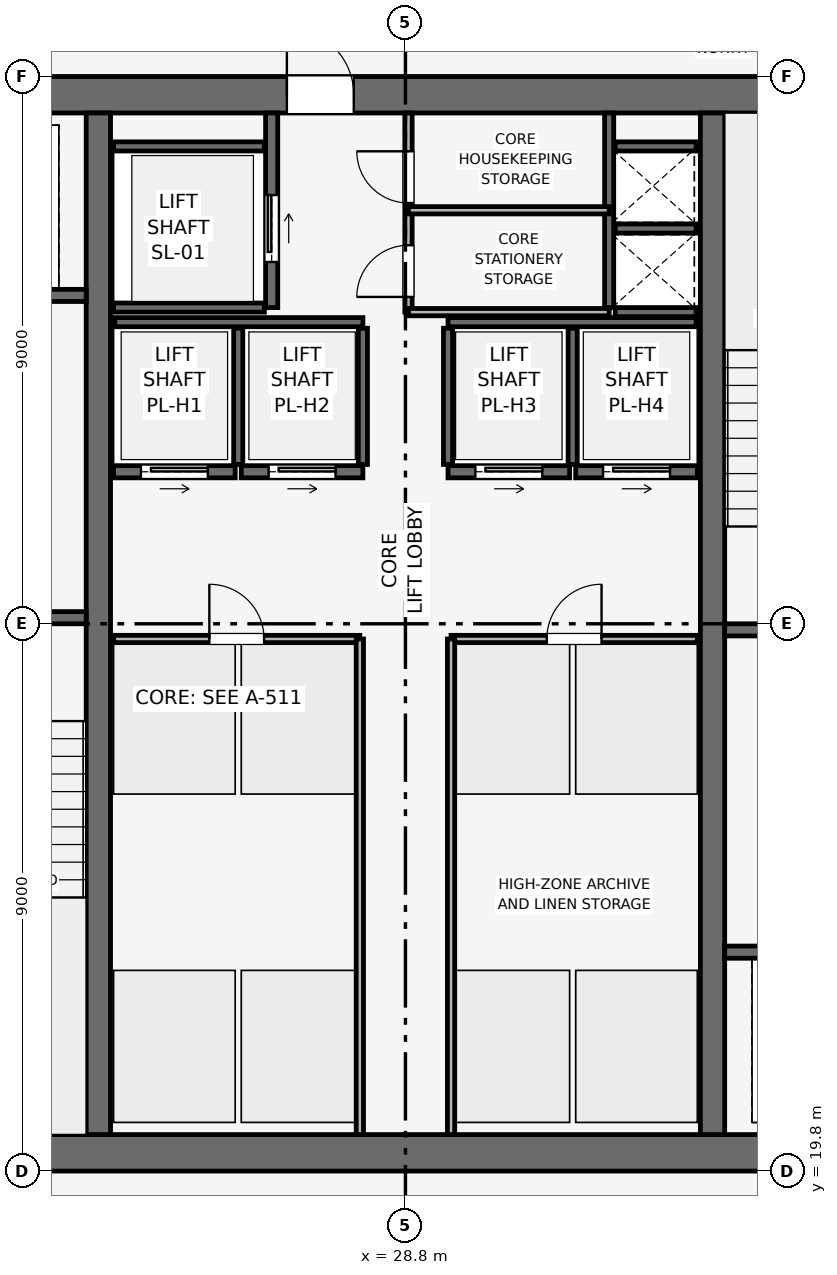
"""IFC4 building model, lengths in metres.
Left out: names, types, materials, properties, quantities, classifications, styles, units other than length and angle.
Written with IfcOpenShell. Run it as: python <this file> out.ifc"""

import sys

from ifc_helpers import new_model, si_unit, direction, frame, frame_2d, origin, place, context, subcontext, project, spatial, rectangle, extrude, element, fill, save


model = new_model("IFC4")
c1 = context("Model", 3, precision=1e-05, world=origin(), true_north=direction((0.0, 1.0)))
c2 = subcontext(c1, "Body", "Model", "MODEL_VIEW")
j1 = project(units=[si_unit("LENGTHUNIT", "METRE"), si_unit("PLANEANGLEUNIT", "RADIAN")], contexts=[c1])
p1 = place(None, origin())
s1 = spatial("IfcSite", under=j1, at=p1, CompositionType="ELEMENT")
p2 = place(p1, origin())
s2 = spatial("IfcBuilding", under=s1, at=p2, CompositionType="ELEMENT")
p3 = place(p2, frame((0.0, 0.0, 306.75)))
s3 = spatial("IfcBuildingStorey", under=s2, at=p3, CompositionType="ELEMENT", Elevation=306.75)
p4 = place(p3, frame((19.8, 20.1, 0.0), z_axis=(0.0, 0.0, 1.0), x_axis=(1.0, 0.0, 0.0)))
e1 = element("IfcWall", 1, at=p4, inside=s3, PredefinedType="SHEAR", context=c2, shape_type="SweptSolid", body=[
    extrude(rectangle(XDim=18.0, YDim=0.6, at=frame_2d((9.0, 0.0))), origin(), (0.0, 0.0, 1.0), 3.75),
])
p5 = place(p3, frame((19.8, 37.5, 0.0), z_axis=(0.0, 0.0, 1.0), x_axis=(1.0, 0.0, 0.0)))
e2 = element("IfcWall", 2, at=p5, inside=s3, PredefinedType="SHEAR", context=c2, shape_type="SweptSolid", body=[
    extrude(rectangle(XDim=18.0, YDim=0.6, at=frame_2d((9.0, 0.0))), origin(), (0.0, 0.0, 1.0), 3.75),
])
p6 = place(p5, frame((7.05, 0.0, 0.0)))
e3 = element("IfcOpeningElement", 3, at=p6, cuts=e2, PredefinedType="OPENING", context=c2, shape_type="SweptSolid", body=[
    extrude(rectangle(XDim=1.1, YDim=2.15, at=frame_2d((0.55, 1.075))), frame((0.0, 0.31, 0.0), z_axis=(0.0, -1.0, 0.0), x_axis=(1.0, 0.0, 0.0)), (0.0, 0.0, 1.0), 0.62),
])
for number, where, z_axis, x_axis in (
    (4, (23.75, 20.4, 0.0), (0.0, 0.0, 1.0), (0.0, 1.0, 0.0)),
    (5, (33.85, 20.4, 0.0), (0.0, 0.0, 1.0), (0.0, 1.0, 0.0)),
):
    element("IfcWall", number, at=place(p3, frame(where, z_axis=z_axis, x_axis=x_axis)), inside=s3, PredefinedType="SHEAR", context=c2, shape_type="SweptSolid", body=[
        extrude(rectangle(XDim=16.8, YDim=0.4, at=frame_2d((8.4, 0.0))), origin(), (0.0, 0.0, 1.0), 3.75),
    ])
p7 = place(p3, frame((20.4, 28.9, 0.0), z_axis=(0.0, 0.0, 1.0), x_axis=(1.0, 0.0, 0.0)))
e6 = element("IfcWall", 6, at=p7, inside=s3, PredefinedType="SHEAR", context=c2, shape_type="SweptSolid", body=[
    extrude(rectangle(XDim=3.15, YDim=0.2, at=frame_2d((1.575, 0.0))), origin(), (0.0, 0.0, 1.0), 3.51),
])
p8 = place(p7, frame((0.8, 0.0, 0.0)))
e7 = element("IfcOpeningElement", 7, at=p8, cuts=e6, PredefinedType="OPENING", context=c2, shape_type="SweptSolid", body=[
    extrude(rectangle(XDim=1.0, YDim=2.1, at=frame_2d((0.5, 1.05))), frame((0.0, 0.11, 0.0), z_axis=(0.0, -1.0, 0.0), x_axis=(1.0, 0.0, 0.0)), (0.0, 0.0, 1.0), 0.22),
])
p9 = place(p3, frame((34.05, 28.7, 0.0), z_axis=(0.0, 0.0, 1.0), x_axis=(1.0, 0.0, 0.0)))
e8 = element("IfcWall", 8, at=p9, inside=s3, PredefinedType="SHEAR", context=c2, shape_type="SweptSolid", body=[
    extrude(rectangle(XDim=3.15, YDim=0.2, at=frame_2d((1.575, 0.0))), origin(), (0.0, 0.0, 1.0), 3.51),
])
p10 = place(p9, frame((0.8, 0.0, 0.0)))
e9 = element("IfcOpeningElement", 9, at=p10, cuts=e8, PredefinedType="OPENING", context=c2, shape_type="SweptSolid", body=[
    extrude(rectangle(XDim=1.0, YDim=2.1, at=frame_2d((0.5, 1.05))), frame((0.0, 0.11, 0.0), z_axis=(0.0, -1.0, 0.0), x_axis=(1.0, 0.0, 0.0)), (0.0, 0.0, 1.0), 0.22),
])
p11 = place(p3, frame((32.15, 34.0, 0.0), z_axis=(0.0, 0.0, 1.0), x_axis=(0.0, 1.0, 0.0)))
e10 = element("IfcWall", 10, at=p11, inside=s3, PredefinedType="SHEAR", context=c2, shape_type="SweptSolid", body=[
    extrude(rectangle(XDim=3.2, YDim=0.15, at=frame_2d((1.6, 0.0))), origin(), (0.0, 0.0, 1.0), 3.51),
])
for number, where, z_axis, x_axis in (
    (11, (32.25, 33.925, 0.0), (0.0, 0.0, 1.0), (1.0, 0.0, 0.0)),
    (12, (32.25, 35.3, 0.0), (0.0, 0.0, 1.0), (1.0, 0.0, 0.0)),
):
    element("IfcWall", number, at=place(p3, frame(where, z_axis=z_axis, x_axis=x_axis)), inside=s3, PredefinedType="SHEAR", context=c2, shape_type="SweptSolid", body=[
        extrude(rectangle(XDim=1.33, YDim=0.15, at=frame_2d((0.665, 0.0))), origin(), (0.0, 0.0, 1.0), 3.51),
    ])
p12 = place(p3, frame((20.5, 34.2, 0.0), z_axis=(0.0, 0.0, 1.0), x_axis=(1.0, 0.0, 0.0)))
e13 = element("IfcWall", 13, at=p12, inside=s3, PredefinedType="SHEAR", context=c2, shape_type="SweptSolid", body=[
    extrude(rectangle(XDim=3.05, YDim=0.2, at=frame_2d((1.525, 0.0))), origin(), (0.0, 0.0, 1.0), 3.51),
])
p13 = place(p12, frame((0.75, 0.0, 0.0)))
e14 = element("IfcOpeningElement", 14, at=p13, cuts=e13, PredefinedType="OPENING", context=c2, shape_type="SweptSolid", body=[
    extrude(rectangle(XDim=1.1, YDim=2.15, at=frame_2d((0.55, 1.075))), frame((0.0, 0.11, 0.0), z_axis=(0.0, -1.0, 0.0), x_axis=(1.0, 0.0, 0.0)), (0.0, 0.0, 1.0), 0.22),
])
p14 = place(p3, frame((34.05, 23.4, 0.0), z_axis=(0.0, 0.0, 1.0), x_axis=(1.0, 0.0, 0.0)))
e15 = element("IfcWall", 15, at=p14, inside=s3, PredefinedType="SHEAR", context=c2, shape_type="SweptSolid", body=[
    extrude(rectangle(XDim=3.05, YDim=0.2, at=frame_2d((1.525, 0.0))), origin(), (0.0, 0.0, 1.0), 3.51),
])
p15 = place(p14, frame((1.2, 0.0, 0.0)))
e16 = element("IfcOpeningElement", 16, at=p15, cuts=e15, PredefinedType="OPENING", context=c2, shape_type="SweptSolid", body=[
    extrude(rectangle(XDim=1.1, YDim=2.15, at=frame_2d((0.55, 1.075))), frame((0.0, 0.11, 0.0), z_axis=(0.0, -1.0, 0.0), x_axis=(1.0, 0.0, 0.0)), (0.0, 0.0, 1.0), 0.22),
])
p16 = place(p3, frame((26.6, 34.0, 0.0), z_axis=(0.0, 0.0, 1.0), x_axis=(0.0, 1.0, 0.0)))
e17 = element("IfcWall", 17, at=p16, inside=s3, PredefinedType="SHEAR", context=c2, shape_type="SweptSolid", body=[
    extrude(rectangle(XDim=3.2, YDim=0.2, at=frame_2d((1.6, 0.0))), origin(), (0.0, 0.0, 1.0), 3.51),
])
p17 = place(p16, frame((0.75, 0.0, 0.0)))
e18 = element("IfcOpeningElement", 18, at=p17, cuts=e17, PredefinedType="OPENING", context=c2, shape_type="SweptSolid", body=[
    extrude(rectangle(XDim=1.1, YDim=2.15, at=frame_2d((0.55, 1.075))), frame((0.0, 0.11, 0.0), z_axis=(0.0, -1.0, 0.0), x_axis=(1.0, 0.0, 0.0)), (0.0, 0.0, 1.0), 0.22),
])
for number, where, z_axis, x_axis in (
    (19, (24.0, 34.0, 0.0), (0.0, 0.0, 1.0), (1.0, 0.0, 0.0)),
    (20, (24.0, 36.65, 0.0), (0.0, 0.0, 1.0), (1.0, 0.0, 0.0)),
):
    element("IfcWall", number, at=place(p3, frame(where, z_axis=z_axis, x_axis=x_axis)), inside=s3, PredefinedType="SHEAR", context=c2, shape_type="SweptSolid", body=[
        extrude(rectangle(XDim=2.48, YDim=0.15, at=frame_2d((1.24, 0.0))), origin(), (0.0, 0.0, 1.0), 3.51),
    ])
p18 = place(p3, frame((24.0, 31.3, 0.0), z_axis=(0.0, 0.0, 1.0), x_axis=(1.0, 0.0, 0.0)))
e21 = element("IfcWall", 21, at=p18, inside=s3, PredefinedType="SHEAR", context=c2, shape_type="SweptSolid", body=[
    extrude(rectangle(XDim=2.0, YDim=0.2, at=frame_2d((1.0, 0.0))), origin(), (0.0, 0.0, 1.0), 3.51),
])
p19 = place(p18, frame((0.45, 0.0, 0.0)))
e22 = element("IfcOpeningElement", 22, at=p19, cuts=e21, PredefinedType="OPENING", context=c2, shape_type="SweptSolid", body=[
    extrude(rectangle(XDim=1.1, YDim=2.15, at=frame_2d((0.55, 1.075))), frame((0.0, 0.11, 0.0), z_axis=(0.0, -1.0, 0.0), x_axis=(1.0, 0.0, 0.0)), (0.0, 0.0, 1.0), 0.22),
])
p20 = place(p3, frame((26.1, 31.3, 0.0), z_axis=(0.0, 0.0, 1.0), x_axis=(1.0, 0.0, 0.0)))
e23 = element("IfcWall", 23, at=p20, inside=s3, PredefinedType="SHEAR", context=c2, shape_type="SweptSolid", body=[
    extrude(rectangle(XDim=2.0, YDim=0.2, at=frame_2d((1.0, 0.0))), origin(), (0.0, 0.0, 1.0), 3.51),
])
p21 = place(p20, frame((0.45, 0.0, 0.0)))
e24 = element("IfcOpeningElement", 24, at=p21, cuts=e23, PredefinedType="OPENING", context=c2, shape_type="SweptSolid", body=[
    extrude(rectangle(XDim=1.1, YDim=2.15, at=frame_2d((0.55, 1.075))), frame((0.0, 0.11, 0.0), z_axis=(0.0, -1.0, 0.0), x_axis=(1.0, 0.0, 0.0)), (0.0, 0.0, 1.0), 0.22),
])
p22 = place(p3, frame((29.5, 31.3, 0.0), z_axis=(0.0, 0.0, 1.0), x_axis=(1.0, 0.0, 0.0)))
e25 = element("IfcWall", 25, at=p22, inside=s3, PredefinedType="SHEAR", context=c2, shape_type="SweptSolid", body=[
    extrude(rectangle(XDim=2.0, YDim=0.2, at=frame_2d((1.0, 0.0))), origin(), (0.0, 0.0, 1.0), 3.51),
])
p23 = place(p22, frame((0.45, 0.0, 0.0)))
e26 = element("IfcOpeningElement", 26, at=p23, cuts=e25, PredefinedType="OPENING", context=c2, shape_type="SweptSolid", body=[
    extrude(rectangle(XDim=1.1, YDim=2.15, at=frame_2d((0.55, 1.075))), frame((0.0, 0.11, 0.0), z_axis=(0.0, -1.0, 0.0), x_axis=(1.0, 0.0, 0.0)), (0.0, 0.0, 1.0), 0.22),
])
p24 = place(p3, frame((31.6, 31.3, 0.0), z_axis=(0.0, 0.0, 1.0), x_axis=(1.0, 0.0, 0.0)))
e27 = element("IfcWall", 27, at=p24, inside=s3, PredefinedType="SHEAR", context=c2, shape_type="SweptSolid", body=[
    extrude(rectangle(XDim=2.0, YDim=0.2, at=frame_2d((1.0, 0.0))), origin(), (0.0, 0.0, 1.0), 3.51),
])
p25 = place(p24, frame((0.45, 0.0, 0.0)))
e28 = element("IfcOpeningElement", 28, at=p25, cuts=e27, PredefinedType="OPENING", context=c2, shape_type="SweptSolid", body=[
    extrude(rectangle(XDim=1.1, YDim=2.15, at=frame_2d((0.55, 1.075))), frame((0.0, 0.11, 0.0), z_axis=(0.0, -1.0, 0.0), x_axis=(1.0, 0.0, 0.0)), (0.0, 0.0, 1.0), 0.22),
])
p26 = place(p3, frame((32.25, 36.65, 0.0), z_axis=(0.0, 0.0, 1.0), x_axis=(1.0, 0.0, 0.0)))
e29 = element("IfcWall", 29, at=p26, inside=s3, PredefinedType="SHEAR", context=c2, shape_type="SweptSolid", body=[
    extrude(rectangle(XDim=1.33, YDim=0.15, at=frame_2d((0.665, 0.0))), origin(), (0.0, 0.0, 1.0), 3.51),
])
for number, where, z_axis, x_axis in (
    (30, (24.02, 33.76, 0.0), (0.0, 0.0, 1.0), (1.0, 0.0, 0.0)),
    (31, (29.5, 33.76, 0.0), (0.0, 0.0, 1.0), (1.0, 0.0, 0.0)),
):
    element("IfcWall", number, at=place(p3, frame(where, z_axis=z_axis, x_axis=x_axis)), inside=s3, PredefinedType="SHEAR", context=c2, shape_type="SweptSolid", body=[
        extrude(rectangle(XDim=4.08, YDim=0.15, at=frame_2d((2.04, 0.0))), origin(), (0.0, 0.0, 1.0), 3.51),
    ])
for number, where, z_axis, x_axis in (
    (32, (26.05, 31.42, 0.0), (0.0, 0.0, 1.0), (0.0, 1.0, 0.0)),
    (33, (28.1, 31.42, 0.0), (0.0, 0.0, 1.0), (0.0, 1.0, 0.0)),
    (34, (29.5, 31.42, 0.0), (0.0, 0.0, 1.0), (0.0, 1.0, 0.0)),
    (35, (31.55, 31.42, 0.0), (0.0, 0.0, 1.0), (0.0, 1.0, 0.0)),
):
    element("IfcWall", number, at=place(p3, frame(where, z_axis=z_axis, x_axis=x_axis)), inside=s3, PredefinedType="SHEAR", context=c2, shape_type="SweptSolid", body=[
        extrude(rectangle(XDim=2.24, YDim=0.15, at=frame_2d((1.12, 0.0))), origin(), (0.0, 0.0, 1.0), 3.51),
    ])
p27 = place(p3, frame((28.85, 33.925, 0.0), z_axis=(0.0, 0.0, 1.0), x_axis=(0.0, 1.0, 0.0)))
e36 = element("IfcWall", 36, at=p27, inside=s3, PredefinedType="PARTITIONING", context=c2, shape_type="SweptSolid", body=[
    extrude(rectangle(XDim=3.275, YDim=0.12, at=frame_2d((1.637, 0.0))), origin(), (0.0, 0.0, 1.0), 3.51),
])
p28 = place(p27, frame((0.25, 0.0, 0.0)))
e37 = element("IfcOpeningElement", 37, at=p28, cuts=e36, PredefinedType="OPENING", context=c2, shape_type="SweptSolid", body=[
    extrude(rectangle(XDim=0.85, YDim=2.1, at=frame_2d((0.425, 1.05))), frame((0.0, 0.07, 0.0), z_axis=(0.0, -1.0, 0.0), x_axis=(1.0, 0.0, 0.0)), (0.0, 0.0, 1.0), 0.14),
])
p29 = place(p27, frame((1.795, 0.0, 0.0)))
e38 = element("IfcOpeningElement", 38, at=p29, cuts=e36, PredefinedType="OPENING", context=c2, shape_type="SweptSolid", body=[
    extrude(rectangle(XDim=0.85, YDim=2.1, at=frame_2d((0.425, 1.05))), frame((0.0, 0.07, 0.0), z_axis=(0.0, -1.0, 0.0), x_axis=(1.0, 0.0, 0.0)), (0.0, 0.0, 1.0), 0.14),
])
for number, where, z_axis, x_axis in (
    (39, (28.85, 35.6, 0.0), (0.0, 0.0, 1.0), (1.0, 0.0, 0.0)),
    (40, (28.85, 33.925, 0.0), (0.0, 0.0, 1.0), (1.0, 0.0, 0.0)),
):
    element("IfcWall", number, at=place(p3, frame(where, z_axis=z_axis, x_axis=x_axis)), inside=s3, PredefinedType="PARTITIONING", context=c2, shape_type="SweptSolid", body=[
        extrude(rectangle(XDim=3.3, YDim=0.12, at=frame_2d((1.65, 0.0))), origin(), (0.0, 0.0, 1.0), 3.51),
    ])
p30 = place(p3, frame((24.0, 28.55, 0.0), z_axis=(0.0, 0.0, 1.0), x_axis=(1.0, 0.0, 0.0)))
e41 = element("IfcWall", 41, at=p30, inside=s3, PredefinedType="PARTITIONING", context=c2, shape_type="SweptSolid", body=[
    extrude(rectangle(XDim=4.05, YDim=0.12, at=frame_2d((2.025, 0.0))), origin(), (0.0, 0.0, 1.0), 3.51),
])
p31 = place(p30, frame((1.575, 0.0, 0.0)))
e42 = element("IfcOpeningElement", 42, at=p31, cuts=e41, PredefinedType="OPENING", context=c2, shape_type="SweptSolid", body=[
    extrude(rectangle(XDim=0.9, YDim=2.1, at=frame_2d((0.45, 1.05))), frame((0.0, 0.07, 0.0), z_axis=(0.0, -1.0, 0.0), x_axis=(1.0, 0.0, 0.0)), (0.0, 0.0, 1.0), 0.14),
])
p32 = place(p3, frame((28.05, 20.4, 0.0), z_axis=(0.0, 0.0, 1.0), x_axis=(0.0, 1.0, 0.0)))
e43 = element("IfcWall", 43, at=p32, inside=s3, PredefinedType="PARTITIONING", context=c2, shape_type="SweptSolid", body=[
    extrude(rectangle(XDim=8.15, YDim=0.12, at=frame_2d((4.075, 0.0))), origin(), (0.0, 0.0, 1.0), 3.51),
])
p33 = place(p3, frame((29.55, 28.55, 0.0), z_axis=(0.0, 0.0, 1.0), x_axis=(1.0, 0.0, 0.0)))
e44 = element("IfcWall", 44, at=p33, inside=s3, PredefinedType="PARTITIONING", context=c2, shape_type="SweptSolid", body=[
    extrude(rectangle(XDim=4.05, YDim=0.12, at=frame_2d((2.025, 0.0))), origin(), (0.0, 0.0, 1.0), 3.51),
])
p34 = place(p33, frame((1.575, 0.0, 0.0)))
e45 = element("IfcOpeningElement", 45, at=p34, cuts=e44, PredefinedType="OPENING", context=c2, shape_type="SweptSolid", body=[
    extrude(rectangle(XDim=0.9, YDim=2.1, at=frame_2d((0.45, 1.05))), frame((0.0, 0.07, 0.0), z_axis=(0.0, -1.0, 0.0), x_axis=(1.0, 0.0, 0.0)), (0.0, 0.0, 1.0), 0.14),
])
p35 = place(p3, frame((29.55, 20.4, 0.0), z_axis=(0.0, 0.0, 1.0), x_axis=(0.0, 1.0, 0.0)))
e46 = element("IfcWall", 46, at=p35, inside=s3, PredefinedType="PARTITIONING", context=c2, shape_type="SweptSolid", body=[
    extrude(rectangle(XDim=8.15, YDim=0.12, at=frame_2d((4.075, 0.0))), origin(), (0.0, 0.0, 1.0), 3.51),
])
p36 = place(p17, origin())
e47 = element("IfcDoor", 47, at=p36, inside=s3, OperationType="SLIDING_TO_RIGHT", PredefinedType="DOOR", context=c2, shape_type="SweptSolid", body=[
    extrude(rectangle(XDim=1.1, YDim=2.15, at=frame_2d((0.55, 1.075))), frame((0.0, 0.025, 0.0), z_axis=(0.0, -1.0, 0.0), x_axis=(1.0, 0.0, 0.0)), (0.0, 0.0, 1.0), 0.05),
])
fill(e18, e47)
p37 = place(p19, origin())
e48 = element("IfcDoor", 48, at=p37, inside=s3, OperationType="SLIDING_TO_RIGHT", PredefinedType="DOOR", context=c2, shape_type="SweptSolid", body=[
    extrude(rectangle(XDim=1.1, YDim=2.15, at=frame_2d((0.55, 1.075))), frame((0.0, 0.025, 0.0), z_axis=(0.0, -1.0, 0.0), x_axis=(1.0, 0.0, 0.0)), (0.0, 0.0, 1.0), 0.05),
])
fill(e22, e48)
p38 = place(p21, origin())
e49 = element("IfcDoor", 49, at=p38, inside=s3, OperationType="SLIDING_TO_RIGHT", PredefinedType="DOOR", context=c2, shape_type="SweptSolid", body=[
    extrude(rectangle(XDim=1.1, YDim=2.15, at=frame_2d((0.55, 1.075))), frame((0.0, 0.025, 0.0), z_axis=(0.0, -1.0, 0.0), x_axis=(1.0, 0.0, 0.0)), (0.0, 0.0, 1.0), 0.05),
])
fill(e24, e49)
p39 = place(p23, origin())
e50 = element("IfcDoor", 50, at=p39, inside=s3, OperationType="SLIDING_TO_RIGHT", PredefinedType="DOOR", context=c2, shape_type="SweptSolid", body=[
    extrude(rectangle(XDim=1.1, YDim=2.15, at=frame_2d((0.55, 1.075))), frame((0.0, 0.025, 0.0), z_axis=(0.0, -1.0, 0.0), x_axis=(1.0, 0.0, 0.0)), (0.0, 0.0, 1.0), 0.05),
])
fill(e26, e50)
p40 = place(p25, origin())
e51 = element("IfcDoor", 51, at=p40, inside=s3, OperationType="SLIDING_TO_RIGHT", PredefinedType="DOOR", context=c2, shape_type="SweptSolid", body=[
    extrude(rectangle(XDim=1.1, YDim=2.15, at=frame_2d((0.55, 1.075))), frame((0.0, 0.025, 0.0), z_axis=(0.0, -1.0, 0.0), x_axis=(1.0, 0.0, 0.0)), (0.0, 0.0, 1.0), 0.05),
])
fill(e28, e51)
p41 = place(p28, origin())
e52 = element("IfcDoor", 52, at=p41, inside=s3, OperationType="SINGLE_SWING_LEFT", PredefinedType="DOOR", context=c2, shape_type="SweptSolid", body=[
    extrude(rectangle(XDim=0.85, YDim=2.1, at=frame_2d((0.425, 1.05))), frame((0.0, 0.025, 0.0), z_axis=(0.0, -1.0, 0.0), x_axis=(1.0, 0.0, 0.0)), (0.0, 0.0, 1.0), 0.05),
])
fill(e37, e52)
p42 = place(p29, origin())
e53 = element("IfcDoor", 53, at=p42, inside=s3, OperationType="SINGLE_SWING_RIGHT", PredefinedType="DOOR", context=c2, shape_type="SweptSolid", body=[
    extrude(rectangle(XDim=0.85, YDim=2.1, at=frame_2d((0.425, 1.05))), frame((0.0, 0.025, 0.0), z_axis=(0.0, -1.0, 0.0), x_axis=(1.0, 0.0, 0.0)), (0.0, 0.0, 1.0), 0.05),
])
fill(e38, e53)
p43 = place(p31, origin())
e54 = element("IfcDoor", 54, at=p43, inside=s3, OperationType="SINGLE_SWING_LEFT", PredefinedType="DOOR", context=c2, shape_type="SweptSolid", body=[
    extrude(rectangle(XDim=0.9, YDim=2.1, at=frame_2d((0.45, 1.05))), frame((0.0, 0.025, 0.0), z_axis=(0.0, -1.0, 0.0), x_axis=(1.0, 0.0, 0.0)), (0.0, 0.0, 1.0), 0.05),
])
fill(e42, e54)
p44 = place(p34, origin())
e55 = element("IfcDoor", 55, at=p44, inside=s3, OperationType="SINGLE_SWING_RIGHT", PredefinedType="DOOR", context=c2, shape_type="SweptSolid", body=[
    extrude(rectangle(XDim=0.9, YDim=2.1, at=frame_2d((0.45, 1.05))), frame((0.0, 0.025, 0.0), z_axis=(0.0, -1.0, 0.0), x_axis=(1.0, 0.0, 0.0)), (0.0, 0.0, 1.0), 0.05),
])
fill(e45, e55)
p45 = place(p6, origin())
e56 = element("IfcDoor", 56, at=p45, inside=s3, OperationType="SINGLE_SWING_LEFT", PredefinedType="DOOR", context=c2, shape_type="SweptSolid", body=[
    extrude(rectangle(XDim=1.1, YDim=2.15, at=frame_2d((0.55, 1.075))), frame((0.0, 0.025, 0.0), z_axis=(0.0, -1.0, 0.0), x_axis=(1.0, 0.0, 0.0)), (0.0, 0.0, 1.0), 0.05),
])
fill(e3, e56)
save(model, sys.argv[1])
